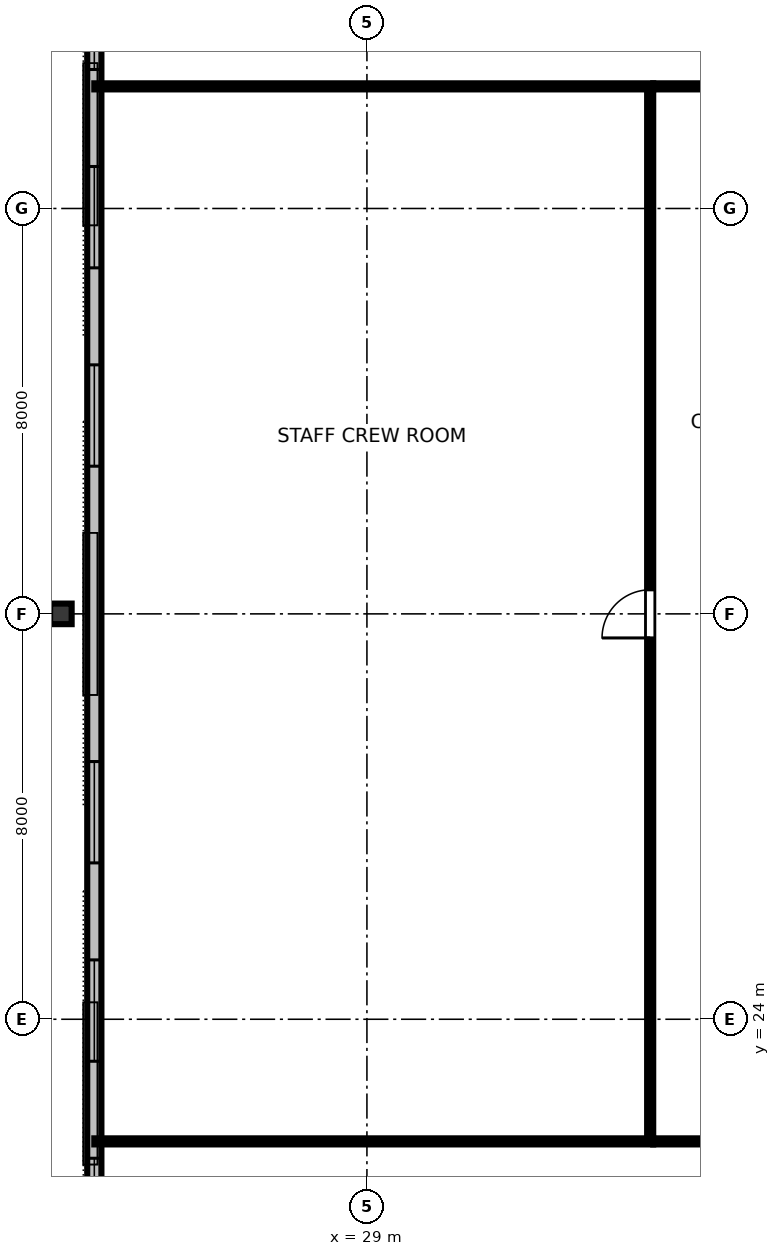
"""IFC4 building model, lengths in metres.
Left out: names, types, materials, properties, quantities, classifications, styles, units other than length and angle.
Written with IfcOpenShell. Run it as: python <this file> out.ifc"""

import sys

from ifc_helpers import new_model, si_unit, direction, frame, frame_2d, origin, origin_2d, place, context, subcontext, project, spatial, rectangle, i_section, extrude, element, fill, save


model = new_model("IFC4")
c1 = context("Model", 3, precision=1e-05, world=origin(), true_north=direction((0.0, 1.0)))
c2 = subcontext(c1, "Body", "Model", "MODEL_VIEW")
j1 = project(units=[si_unit("LENGTHUNIT", "METRE"), si_unit("PLANEANGLEUNIT", "RADIAN")], contexts=[c1])
p1 = place(None, origin())
s1 = spatial("IfcSite", under=j1, at=p1, CompositionType="ELEMENT")
p2 = place(p1, origin())
s2 = spatial("IfcBuilding", under=s1, at=p2, CompositionType="ELEMENT")
p3 = place(p2, frame((0.0, 0.0, 177.0)))
s3 = spatial("IfcBuildingStorey", under=s2, at=p3, CompositionType="ELEMENT", Elevation=177.0)
p4 = place(p3, frame((22.96, 32.0, 0.0), z_axis=(0.0, 0.0, 1.0), x_axis=(0.0, 1.0, 0.0)))
e1 = element("IfcColumn", 1, at=p4, inside=s3, PredefinedType="COLUMN", context=c2, shape_type="SweptSolid", body=[
    extrude(i_section(OverallWidth=0.406, OverallDepth=0.425, WebThickness=0.033, FlangeThickness=0.052, FilletRadius=0.025, at=origin_2d()), origin(), (0.0, 0.0, 1.0), 3.358),
])
p5 = place(p3, frame((23.62, 46.8, 0.0), z_axis=(0.0, 0.0, 1.0), x_axis=(0.0, -1.0, 0.0)))
e2 = element("IfcWall", 2, at=p5, inside=s3, PredefinedType="STANDARD", context=c2, shape_type="SweptSolid", body=[
    extrude(rectangle(XDim=29.6, YDim=0.28, at=frame_2d((14.8, 0.0))), origin(), (0.0, 0.0, 1.0), 3.36),
])
p6 = place(p5, frame((2.057, 0.0, 0.8)))
e3 = element("IfcOpeningElement", 3, at=p6, cuts=e2, PredefinedType="OPENING", context=c2, shape_type="SweptSolid", body=[
    extrude(rectangle(XDim=2.0, YDim=1.95, at=frame_2d((1.0, 0.975))), frame((0.0, 0.15, 0.0), z_axis=(0.0, -1.0, 0.0), x_axis=(1.0, 0.0, 0.0)), (0.0, 0.0, 1.0), 0.3),
])
p7 = place(p5, frame((5.971, 0.0, 0.8)))
e4 = element("IfcOpeningElement", 4, at=p7, cuts=e2, PredefinedType="OPENING", context=c2, shape_type="SweptSolid", body=[
    extrude(rectangle(XDim=2.0, YDim=1.95, at=frame_2d((1.0, 0.975))), frame((0.0, 0.15, 0.0), z_axis=(0.0, -1.0, 0.0), x_axis=(1.0, 0.0, 0.0)), (0.0, 0.0, 1.0), 0.3),
])
p8 = place(p5, frame((9.886, 0.0, 0.8)))
e5 = element("IfcOpeningElement", 5, at=p8, cuts=e2, PredefinedType="OPENING", context=c2, shape_type="SweptSolid", body=[
    extrude(rectangle(XDim=2.0, YDim=1.95, at=frame_2d((1.0, 0.975))), frame((0.0, 0.15, 0.0), z_axis=(0.0, -1.0, 0.0), x_axis=(1.0, 0.0, 0.0)), (0.0, 0.0, 1.0), 0.3),
])
p9 = place(p5, frame((17.714, 0.0, 0.8)))
e6 = element("IfcOpeningElement", 6, at=p9, cuts=e2, PredefinedType="OPENING", context=c2, shape_type="SweptSolid", body=[
    extrude(rectangle(XDim=2.0, YDim=1.95, at=frame_2d((1.0, 0.975))), frame((0.0, 0.15, 0.0), z_axis=(0.0, -1.0, 0.0), x_axis=(1.0, 0.0, 0.0)), (0.0, 0.0, 1.0), 0.3),
])
p10 = place(p5, frame((21.629, 0.0, 0.8)))
e7 = element("IfcOpeningElement", 7, at=p10, cuts=e2, PredefinedType="OPENING", context=c2, shape_type="SweptSolid", body=[
    extrude(rectangle(XDim=2.0, YDim=1.95, at=frame_2d((1.0, 0.975))), frame((0.0, 0.15, 0.0), z_axis=(0.0, -1.0, 0.0), x_axis=(1.0, 0.0, 0.0)), (0.0, 0.0, 1.0), 0.3),
])
p11 = place(p5, frame((25.543, 0.0, 0.8)))
e8 = element("IfcOpeningElement", 8, at=p11, cuts=e2, PredefinedType="OPENING", context=c2, shape_type="SweptSolid", body=[
    extrude(rectangle(XDim=2.0, YDim=1.95, at=frame_2d((1.0, 0.975))), frame((0.0, 0.15, 0.0), z_axis=(0.0, -1.0, 0.0), x_axis=(1.0, 0.0, 0.0)), (0.0, 0.0, 1.0), 0.3),
])
p12 = place(p3, frame((34.65, 21.59, 0.0), z_axis=(0.0, 0.0, 1.0), x_axis=(1.0, 0.0, 0.0)))
e9 = element("IfcWall", 9, at=p12, inside=s3, PredefinedType="PARTITIONING", context=c2, shape_type="SweptSolid", body=[
    extrude(rectangle(XDim=10.33, YDim=0.12, at=frame_2d((5.165, 0.0))), origin(), (0.0, 0.0, 1.0), 2.64),
])
p13 = place(p12, frame((3.365, 0.0, 0.0)))
e10 = element("IfcOpeningElement", 10, at=p13, cuts=e9, PredefinedType="OPENING", context=c2, shape_type="SweptSolid", body=[
    extrude(rectangle(XDim=0.95, YDim=2.15, at=frame_2d((0.475, 1.075))), frame((0.0, 0.07, 0.0), z_axis=(0.0, -1.0, 0.0), x_axis=(1.0, 0.0, 0.0)), (0.0, 0.0, 1.0), 0.14),
])
p14 = place(p12, frame((8.46, 0.0, 0.0)))
e11 = element("IfcOpeningElement", 11, at=p14, cuts=e9, PredefinedType="OPENING", context=c2, shape_type="SweptSolid", body=[
    extrude(rectangle(XDim=0.95, YDim=2.15, at=frame_2d((0.475, 1.075))), frame((0.0, 0.07, 0.0), z_axis=(0.0, -1.0, 0.0), x_axis=(1.0, 0.0, 0.0)), (0.0, 0.0, 1.0), 0.14),
])
p15 = place(p3, frame((34.65, 42.41, 0.0), z_axis=(0.0, 0.0, 1.0), x_axis=(1.0, 0.0, 0.0)))
e12 = element("IfcWall", 12, at=p15, inside=s3, PredefinedType="PARTITIONING", context=c2, shape_type="SweptSolid", body=[
    extrude(rectangle(XDim=10.33, YDim=0.12, at=frame_2d((5.165, 0.0))), origin(), (0.0, 0.0, 1.0), 2.64),
])
p16 = place(p15, frame((2.59, 0.0, 0.0)))
e13 = element("IfcOpeningElement", 13, at=p16, cuts=e12, PredefinedType="OPENING", context=c2, shape_type="SweptSolid", body=[
    extrude(rectangle(XDim=0.95, YDim=2.15, at=frame_2d((0.475, 1.075))), frame((0.0, 0.07, 0.0), z_axis=(0.0, -1.0, 0.0), x_axis=(1.0, 0.0, 0.0)), (0.0, 0.0, 1.0), 0.14),
])
p17 = place(p15, frame((7.685, 0.0, 0.0)))
e14 = element("IfcOpeningElement", 14, at=p17, cuts=e12, PredefinedType="OPENING", context=c2, shape_type="SweptSolid", body=[
    extrude(rectangle(XDim=0.95, YDim=2.15, at=frame_2d((0.475, 1.075))), frame((0.0, 0.07, 0.0), z_axis=(0.0, -1.0, 0.0), x_axis=(1.0, 0.0, 0.0)), (0.0, 0.0, 1.0), 0.14),
])
p18 = place(p3, frame((34.59, 21.65, 0.0), z_axis=(0.0, 0.0, 1.0), x_axis=(0.0, 1.0, 0.0)))
e15 = element("IfcWall", 15, at=p18, inside=s3, PredefinedType="PARTITIONING", context=c2, shape_type="SweptSolid", body=[
    extrude(rectangle(XDim=20.7, YDim=0.12, at=frame_2d((10.35, 0.0))), origin(), (0.0, 0.0, 1.0), 2.64),
])
p19 = place(p18, frame((9.875, 0.0, 0.0)))
e16 = element("IfcOpeningElement", 16, at=p19, cuts=e15, PredefinedType="OPENING", context=c2, shape_type="SweptSolid", body=[
    extrude(rectangle(XDim=0.95, YDim=2.15, at=frame_2d((0.475, 1.075))), frame((0.0, 0.07, 0.0), z_axis=(0.0, -1.0, 0.0), x_axis=(1.0, 0.0, 0.0)), (0.0, 0.0, 1.0), 0.14),
])
for number, where, z_axis, x_axis in (
    (17, (34.65, 21.59, 0.0), (0.0, 0.0, 1.0), (-1.0, 0.0, 0.0)),
    (18, (34.65, 42.41, 0.0), (0.0, 0.0, 1.0), (-1.0, 0.0, 0.0)),
):
    element("IfcWall", number, at=place(p3, frame(where, z_axis=z_axis, x_axis=x_axis)), inside=s3, PredefinedType="PARTITIONING", context=c2, shape_type="SweptSolid", body=[
        extrude(rectangle(XDim=11.03, YDim=0.12, at=frame_2d((5.515, 0.0))), origin(), (0.0, 0.0, 1.0), 2.64),
    ])
p20 = place(p6, origin())
e19 = element("IfcWindow", 19, at=p20, inside=s3, PartitioningType="SINGLE_PANEL", PredefinedType="WINDOW", context=c2, shape_type="SweptSolid", body=[
    extrude(rectangle(XDim=2.0, YDim=1.95, at=frame_2d((1.0, 0.975))), frame((0.0, 0.03, 0.0), z_axis=(0.0, -1.0, 0.0), x_axis=(1.0, 0.0, 0.0)), (0.0, 0.0, 1.0), 0.06),
])
fill(e3, e19)
p21 = place(p7, origin())
e20 = element("IfcWindow", 20, at=p21, inside=s3, PartitioningType="SINGLE_PANEL", PredefinedType="WINDOW", context=c2, shape_type="SweptSolid", body=[
    extrude(rectangle(XDim=2.0, YDim=1.95, at=frame_2d((1.0, 0.975))), frame((0.0, 0.03, 0.0), z_axis=(0.0, -1.0, 0.0), x_axis=(1.0, 0.0, 0.0)), (0.0, 0.0, 1.0), 0.06),
])
fill(e4, e20)
p22 = place(p8, origin())
e21 = element("IfcWindow", 21, at=p22, inside=s3, PartitioningType="SINGLE_PANEL", PredefinedType="WINDOW", context=c2, shape_type="SweptSolid", body=[
    extrude(rectangle(XDim=2.0, YDim=1.95, at=frame_2d((1.0, 0.975))), frame((0.0, 0.03, 0.0), z_axis=(0.0, -1.0, 0.0), x_axis=(1.0, 0.0, 0.0)), (0.0, 0.0, 1.0), 0.06),
])
fill(e5, e21)
p23 = place(p9, origin())
e22 = element("IfcWindow", 22, at=p23, inside=s3, PartitioningType="SINGLE_PANEL", PredefinedType="WINDOW", context=c2, shape_type="SweptSolid", body=[
    extrude(rectangle(XDim=2.0, YDim=1.95, at=frame_2d((1.0, 0.975))), frame((0.0, 0.03, 0.0), z_axis=(0.0, -1.0, 0.0), x_axis=(1.0, 0.0, 0.0)), (0.0, 0.0, 1.0), 0.06),
])
fill(e6, e22)
p24 = place(p10, origin())
e23 = element("IfcWindow", 23, at=p24, inside=s3, PartitioningType="SINGLE_PANEL", PredefinedType="WINDOW", context=c2, shape_type="SweptSolid", body=[
    extrude(rectangle(XDim=2.0, YDim=1.95, at=frame_2d((1.0, 0.975))), frame((0.0, 0.03, 0.0), z_axis=(0.0, -1.0, 0.0), x_axis=(1.0, 0.0, 0.0)), (0.0, 0.0, 1.0), 0.06),
])
fill(e7, e23)
p25 = place(p11, origin())
e24 = element("IfcWindow", 24, at=p25, inside=s3, PartitioningType="SINGLE_PANEL", PredefinedType="WINDOW", context=c2, shape_type="SweptSolid", body=[
    extrude(rectangle(XDim=2.0, YDim=1.95, at=frame_2d((1.0, 0.975))), frame((0.0, 0.03, 0.0), z_axis=(0.0, -1.0, 0.0), x_axis=(1.0, 0.0, 0.0)), (0.0, 0.0, 1.0), 0.06),
])
fill(e8, e24)
p26 = place(p19, origin())
e25 = element("IfcDoor", 25, at=p26, inside=s3, OperationType="SINGLE_SWING_LEFT", PredefinedType="DOOR", context=c2, shape_type="SweptSolid", body=[
    extrude(rectangle(XDim=0.95, YDim=2.15, at=frame_2d((0.475, 1.075))), frame((0.0, 0.025, 0.0), z_axis=(0.0, -1.0, 0.0), x_axis=(1.0, 0.0, 0.0)), (0.0, 0.0, 1.0), 0.05),
])
fill(e16, e25)
save(model, sys.argv[1])
